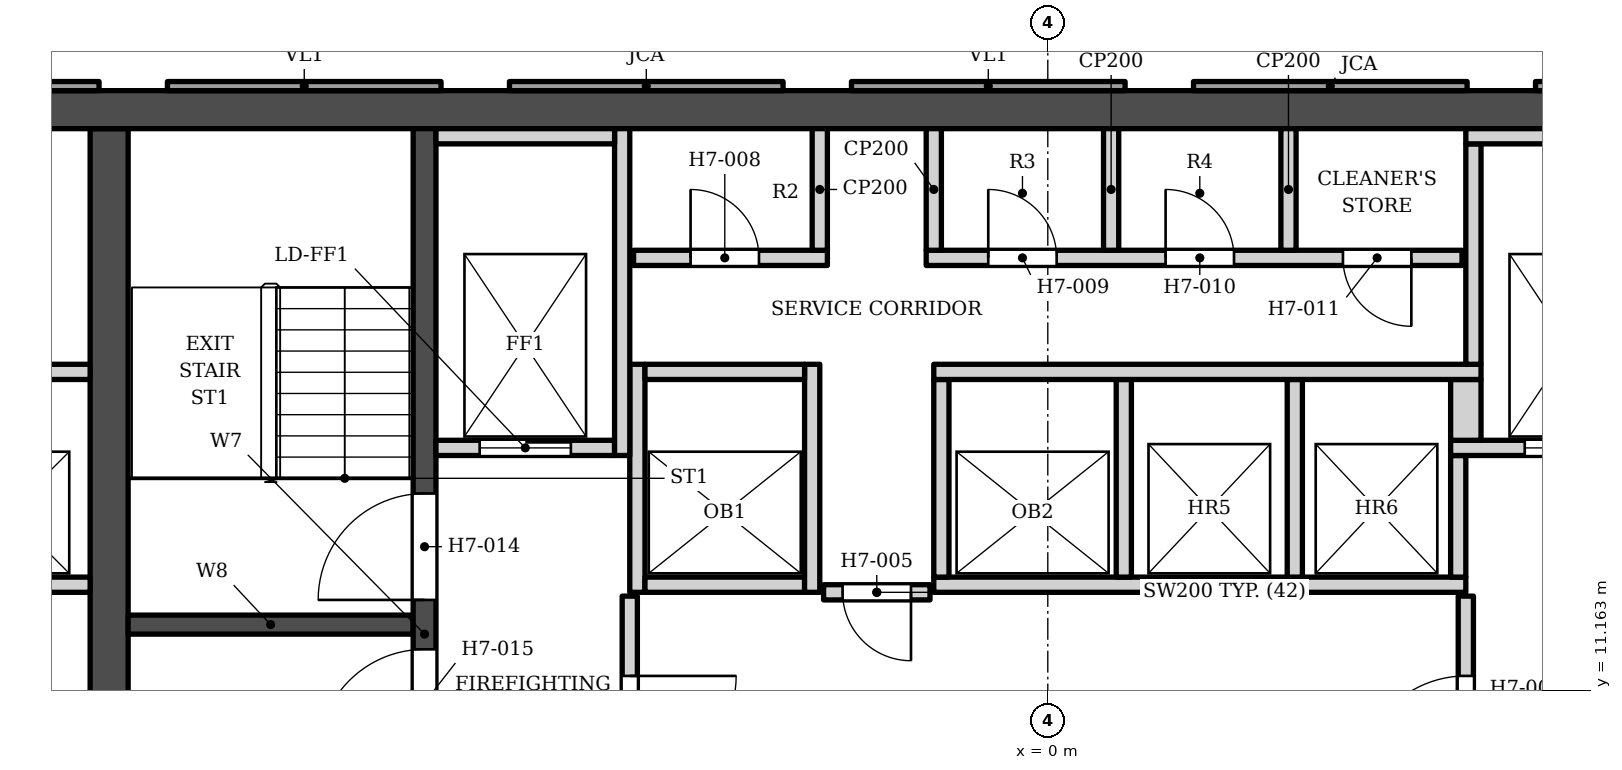
"""IFC4 building model, lengths in metres.
Left out: names, types, materials, properties, quantities, classifications, styles, units other than length and angle.
Written with IfcOpenShell. Run it as: python <this file> out.ifc"""

import sys

from ifc_helpers import new_model, si_unit, direction, frame, frame_2d, origin, place, context, subcontext, project, spatial, polyline, rectangle, outline, extrude, element, fill, save


model = new_model("IFC4")
c1 = context("Model", 3, precision=1e-05, world=origin(), true_north=direction((0.0, 1.0)))
c2 = subcontext(c1, "Body", "Model", "MODEL_VIEW")
j1 = project(units=[si_unit("LENGTHUNIT", "METRE"), si_unit("PLANEANGLEUNIT", "RADIAN")], contexts=[c1])
p1 = place(None, origin())
s1 = spatial("IfcSite", under=j1, at=p1, CompositionType="ELEMENT")
p2 = place(p1, origin())
s2 = spatial("IfcBuilding", under=s1, at=p2, CompositionType="ELEMENT")
p3 = place(p2, frame((0.0, 0.0, 112.2)))
s3 = spatial("IfcBuildingStorey", under=s2, at=p3, CompositionType="ELEMENT", Elevation=112.2)
p4 = place(p3, frame((-16.9, 18.802, 0.0), z_axis=(0.0, 0.0, 1.0), x_axis=(1.0, 0.0, 0.0)))
e1 = element("IfcWall", 1, at=p4, inside=s3, PredefinedType="SHEAR", context=c2, shape_type="SweptSolid", body=[
    extrude(rectangle(XDim=33.8, YDim=0.5, at=frame_2d((16.9, 0.0))), origin(), (0.0, 0.0, 1.0), 3.4),
])
p5 = place(p3, frame((-12.35, 5.253, 0.0), z_axis=(0.0, 0.0, 1.0), x_axis=(0.0, 1.0, 0.0)))
e2 = element("IfcWall", 2, at=p5, inside=s3, PredefinedType="SHEAR", context=c2, shape_type="SweptSolid", body=[
    extrude(rectangle(XDim=13.3, YDim=0.5, at=frame_2d((6.65, 0.0))), origin(), (0.0, 0.0, 1.0), 3.4),
])
p6 = place(p3, frame((-8.2, 5.253, 0.0), z_axis=(0.0, 0.0, 1.0), x_axis=(0.0, 1.0, 0.0)))
e3 = element("IfcWall", 3, at=p6, inside=s3, PredefinedType="SHEAR", context=c2, shape_type="SweptSolid", body=[
    extrude(rectangle(XDim=13.3, YDim=0.3, at=frame_2d((6.65, 0.0))), origin(), (0.0, 0.0, 1.0), 3.4),
])
p7 = place(p6, frame((7.1, 0.0, 0.0)))
e4 = element("IfcOpeningElement", 4, at=p7, cuts=e3, PredefinedType="OPENING", context=c2, shape_type="SweptSolid", body=[
    extrude(rectangle(XDim=1.4, YDim=2.1, at=frame_2d((0.7, 1.05))), frame((0.0, 0.16, 0.0), z_axis=(0.0, -1.0, 0.0), x_axis=(1.0, 0.0, 0.0)), (0.0, 0.0, 1.0), 0.32),
])
p8 = place(p6, frame((5.05, 0.0, 0.0)))
e5 = element("IfcOpeningElement", 5, at=p8, cuts=e3, PredefinedType="OPENING", context=c2, shape_type="SweptSolid", body=[
    extrude(rectangle(XDim=1.4, YDim=2.1, at=frame_2d((0.7, 1.05))), frame((0.0, 0.16, 0.0), z_axis=(0.0, -1.0, 0.0), x_axis=(1.0, 0.0, 0.0)), (0.0, 0.0, 1.0), 0.32),
])
p9 = place(p3, frame((-12.1, 12.028, 0.0), z_axis=(0.0, 0.0, 1.0), x_axis=(1.0, 0.0, 0.0)))
e6 = element("IfcWall", 6, at=p9, inside=s3, PredefinedType="SHEAR", context=c2, shape_type="SweptSolid", body=[
    extrude(rectangle(XDim=3.75, YDim=0.25, at=frame_2d((1.875, 0.0))), origin(), (0.0, 0.0, 1.0), 3.4),
])
p10 = place(p3, origin())
e7 = element("IfcWall", 7, at=p10, inside=s3, PredefinedType="ELEMENTEDWALL", context=c2, shape_type="SweptSolid", body=[
    extrude(outline(polyline([(6.417, 19.173), (6.417, 19.052), (10.017, 19.052), (10.017, 19.173), (6.417, 19.173)])), origin(), (0.0, 0.0, 1.0), 2.65),
])
p11 = place(p3, origin())
e8 = element("IfcWall", 8, at=p11, inside=s3, PredefinedType="SOLIDWALL", context=c2, shape_type="SweptSolid", body=[
    extrude(outline(polyline([(1.917, 19.173), (1.917, 19.052), (5.517, 19.052), (5.517, 19.173), (1.917, 19.173)])), origin(), (0.0, 0.0, 1.0), 2.65),
])
p12 = place(p3, origin())
e9 = element("IfcWall", 9, at=p12, inside=s3, PredefinedType="ELEMENTEDWALL", context=c2, shape_type="SweptSolid", body=[
    extrude(outline(polyline([(-2.583, 19.173), (-2.583, 19.052), (1.017, 19.052), (1.017, 19.173), (-2.583, 19.173)])), origin(), (0.0, 0.0, 1.0), 2.65),
])
p13 = place(p3, origin())
e10 = element("IfcWall", 10, at=p13, inside=s3, PredefinedType="SOLIDWALL", context=c2, shape_type="SweptSolid", body=[
    extrude(outline(polyline([(-7.083, 19.173), (-7.083, 19.052), (-3.483, 19.052), (-3.483, 19.173), (-7.083, 19.173)])), origin(), (0.0, 0.0, 1.0), 2.65),
])
p14 = place(p3, origin())
e11 = element("IfcWall", 11, at=p14, inside=s3, PredefinedType="ELEMENTEDWALL", context=c2, shape_type="SweptSolid", body=[
    extrude(outline(polyline([(-11.583, 19.173), (-11.583, 19.052), (-7.983, 19.052), (-7.983, 19.173), (-11.583, 19.173)])), origin(), (0.0, 0.0, 1.0), 2.65),
])
p15 = place(p3, origin())
e12 = element("IfcWall", 12, at=p15, inside=s3, PredefinedType="SOLIDWALL", context=c2, shape_type="SweptSolid", body=[
    extrude(outline(polyline([(-16.083, 19.173), (-16.083, 19.052), (-12.483, 19.052), (-12.483, 19.173), (-16.083, 19.173)])), origin(), (0.0, 0.0, 1.0), 2.65),
])
p16 = place(p3, frame((-5.5, 9.103, 0.0), z_axis=(0.0, 0.0, 1.0), x_axis=(0.0, 1.0, 0.0)))
e13 = element("IfcWall", 13, at=p16, inside=s3, PredefinedType="SOLIDWALL", context=c2, shape_type="SweptSolid", body=[
    extrude(rectangle(XDim=3.3, YDim=0.2, at=frame_2d((1.65, 0.0))), origin(), (0.0, 0.0, 1.0), 3.23),
])
p17 = place(p16, frame((0.85, 0.0, 0.0)))
e14 = element("IfcOpeningElement", 14, at=p17, cuts=e13, PredefinedType="OPENING", context=c2, shape_type="SweptSolid", body=[
    extrude(rectangle(XDim=1.4, YDim=2.1, at=frame_2d((0.7, 1.05))), frame((0.0, 0.11, 0.0), z_axis=(0.0, -1.0, 0.0), x_axis=(1.0, 0.0, 0.0)), (0.0, 0.0, 1.0), 0.22),
])
p18 = place(p3, frame((5.5, 9.103, 0.0), z_axis=(0.0, 0.0, 1.0), x_axis=(0.0, 1.0, 0.0)))
e15 = element("IfcWall", 15, at=p18, inside=s3, PredefinedType="SOLIDWALL", context=c2, shape_type="SweptSolid", body=[
    extrude(rectangle(XDim=3.3, YDim=0.2, at=frame_2d((1.65, 0.0))), origin(), (0.0, 0.0, 1.0), 3.23),
])
p19 = place(p18, frame((0.85, 0.0, 0.0)))
e16 = element("IfcOpeningElement", 16, at=p19, cuts=e15, PredefinedType="OPENING", context=c2, shape_type="SweptSolid", body=[
    extrude(rectangle(XDim=1.4, YDim=2.1, at=frame_2d((0.7, 1.05))), frame((0.0, 0.11, 0.0), z_axis=(0.0, -1.0, 0.0), x_axis=(1.0, 0.0, 0.0)), (0.0, 0.0, 1.0), 0.22),
])
p20 = place(p3, frame((-2.95, 12.453, 0.0), z_axis=(0.0, 0.0, 1.0), x_axis=(1.0, 0.0, 0.0)))
e17 = element("IfcWall", 17, at=p20, inside=s3, PredefinedType="SOLIDWALL", context=c2, shape_type="SweptSolid", body=[
    extrude(rectangle(XDim=1.4, YDim=0.2, at=frame_2d((0.7, 0.0))), origin(), (0.0, 0.0, 1.0), 3.23),
])
p21 = place(p20, frame((0.25, 0.0, 0.0)))
e18 = element("IfcOpeningElement", 18, at=p21, cuts=e17, PredefinedType="OPENING", context=c2, shape_type="SweptSolid", body=[
    extrude(rectangle(XDim=0.9, YDim=2.1, at=frame_2d((0.45, 1.05))), frame((0.0, 0.11, 0.0), z_axis=(0.0, -1.0, 0.0), x_axis=(1.0, 0.0, 0.0)), (0.0, 0.0, 1.0), 0.22),
])
p22 = place(p3, frame((-16.9, 12.552, 0.0), z_axis=(0.0, 0.0, 1.0), x_axis=(1.0, 0.0, 0.0)))
e19 = element("IfcWall", 19, at=p22, inside=s3, PredefinedType="SOLIDWALL", context=c2, shape_type="SweptSolid", body=[
    extrude(rectangle(XDim=4.3, YDim=0.2, at=frame_2d((2.15, 0.0))), origin(), (0.0, 0.0, 1.0), 3.23),
])
p23 = place(p22, frame((2.675, 0.0, 0.0)))
e20 = element("IfcOpeningElement", 20, at=p23, cuts=e19, PredefinedType="OPENING", context=c2, shape_type="SweptSolid", body=[
    extrude(rectangle(XDim=1.1, YDim=2.1, at=frame_2d((0.55, 1.05))), frame((0.0, 0.11, 0.0), z_axis=(0.0, -1.0, 0.0), x_axis=(1.0, 0.0, 0.0)), (0.0, 0.0, 1.0), 0.22),
])
p24 = place(p22, frame((0.425, 0.0, 0.0)))
e21 = element("IfcOpeningElement", 21, at=p24, cuts=e19, PredefinedType="OPENING", context=c2, shape_type="SweptSolid", body=[
    extrude(rectangle(XDim=1.1, YDim=2.1, at=frame_2d((0.55, 1.05))), frame((0.0, 0.11, 0.0), z_axis=(0.0, -1.0, 0.0), x_axis=(1.0, 0.0, 0.0)), (0.0, 0.0, 1.0), 0.22),
])
p25 = place(p3, frame((-5.4, 12.453, 0.0), z_axis=(0.0, 0.0, 1.0), x_axis=(0.0, 1.0, 0.0)))
e22 = element("IfcWall", 22, at=p25, inside=s3, PredefinedType="SOLIDWALL", context=c2, shape_type="SweptSolid", body=[
    extrude(rectangle(XDim=3.0, YDim=0.2, at=frame_2d((1.5, 0.0))), origin(), (0.0, 0.0, 1.0), 3.23),
])
p26 = place(p3, frame((-5.3, 12.552, 0.0), z_axis=(0.0, 0.0, 1.0), x_axis=(1.0, 0.0, 0.0)))
e23 = element("IfcWall", 23, at=p26, inside=s3, PredefinedType="SOLIDWALL", context=c2, shape_type="SweptSolid", body=[
    extrude(rectangle(XDim=2.1, YDim=0.2, at=frame_2d((1.05, 0.0))), origin(), (0.0, 0.0, 1.0), 3.23),
])
p27 = place(p3, frame((-3.1, 12.453, 0.0), z_axis=(0.0, 0.0, 1.0), x_axis=(0.0, 1.0, 0.0)))
e24 = element("IfcWall", 24, at=p27, inside=s3, PredefinedType="SOLIDWALL", context=c2, shape_type="SweptSolid", body=[
    extrude(rectangle(XDim=3.0, YDim=0.2, at=frame_2d((1.5, 0.0))), origin(), (0.0, 0.0, 1.0), 3.23),
])
p28 = place(p3, frame((-1.5, 12.552, 0.0), z_axis=(0.0, 0.0, 1.0), x_axis=(1.0, 0.0, 0.0)))
e25 = element("IfcWall", 25, at=p28, inside=s3, PredefinedType="SOLIDWALL", context=c2, shape_type="SweptSolid", body=[
    extrude(rectangle(XDim=7.0, YDim=0.2, at=frame_2d((3.5, 0.0))), origin(), (0.0, 0.0, 1.0), 3.23),
])
for number, where, z_axis, x_axis in (
    (26, (-1.4, 12.653, 0.0), (0.0, 0.0, 1.0), (0.0, 1.0, 0.0)),
    (27, (1.0, 12.653, 0.0), (0.0, 0.0, 1.0), (0.0, 1.0, 0.0)),
    (28, (3.25, 12.653, 0.0), (0.0, 0.0, 1.0), (0.0, 1.0, 0.0)),
):
    element("IfcWall", number, at=place(p3, frame(where, z_axis=z_axis, x_axis=x_axis)), inside=s3, PredefinedType="SOLIDWALL", context=c2, shape_type="SweptSolid", body=[
        extrude(rectangle(XDim=2.6, YDim=0.2, at=frame_2d((1.3, 0.0))), origin(), (0.0, 0.0, 1.0), 3.23),
    ])
p29 = place(p3, frame((5.4, 12.653, 0.0), z_axis=(0.0, 0.0, 1.0), x_axis=(0.0, 1.0, 0.0)))
e29 = element("IfcWall", 29, at=p29, inside=s3, PredefinedType="SOLIDWALL", context=c2, shape_type="SweptSolid", body=[
    extrude(rectangle(XDim=1.6, YDim=0.2, at=frame_2d((0.8, 0.0))), origin(), (0.0, 0.0, 1.0), 3.23),
])
p30 = place(p3, frame((-8.05, 14.353, 0.0), z_axis=(0.0, 0.0, 1.0), x_axis=(1.0, 0.0, 0.0)))
e30 = element("IfcWall", 30, at=p30, inside=s3, PredefinedType="SOLIDWALL", context=c2, shape_type="SweptSolid", body=[
    extrude(rectangle(XDim=2.35, YDim=0.2, at=frame_2d((1.175, 0.0))), origin(), (0.0, 0.0, 1.0), 3.23),
])
p31 = place(p30, frame((0.575, 0.0, 0.0)))
e31 = element("IfcOpeningElement", 31, at=p31, cuts=e30, PredefinedType="OPENING", context=c2, shape_type="SweptSolid", body=[
    extrude(rectangle(XDim=1.2, YDim=2.1, at=frame_2d((0.6, 1.05))), frame((0.0, 0.11, 0.0), z_axis=(0.0, -1.0, 0.0), x_axis=(1.0, 0.0, 0.0)), (0.0, 0.0, 1.0), 0.22),
])
p32 = place(p3, frame((-5.6, 14.253, 0.0), z_axis=(0.0, 0.0, 1.0), x_axis=(0.0, 1.0, 0.0)))
e32 = element("IfcWall", 32, at=p32, inside=s3, PredefinedType="SOLIDWALL", context=c2, shape_type="SweptSolid", body=[
    extrude(rectangle(XDim=4.3, YDim=0.2, at=frame_2d((2.15, 0.0))), origin(), (0.0, 0.0, 1.0), 3.23),
])
p33 = place(p3, frame((5.3, 14.353, 0.0), z_axis=(0.0, 0.0, 1.0), x_axis=(1.0, 0.0, 0.0)))
e33 = element("IfcWall", 33, at=p33, inside=s3, PredefinedType="SOLIDWALL", context=c2, shape_type="SweptSolid", body=[
    extrude(rectangle(XDim=2.75, YDim=0.2, at=frame_2d((1.375, 0.0))), origin(), (0.0, 0.0, 1.0), 3.23),
])
p34 = place(p33, frame((0.975, 0.0, 0.0)))
e34 = element("IfcOpeningElement", 34, at=p34, cuts=e33, PredefinedType="OPENING", context=c2, shape_type="SweptSolid", body=[
    extrude(rectangle(XDim=1.2, YDim=2.1, at=frame_2d((0.6, 1.05))), frame((0.0, 0.11, 0.0), z_axis=(0.0, -1.0, 0.0), x_axis=(1.0, 0.0, 0.0)), (0.0, 0.0, 1.0), 0.22),
])
p35 = place(p3, frame((5.5, 14.453, 0.0), z_axis=(0.0, 0.0, 1.0), x_axis=(0.0, 1.0, 0.0)))
e35 = element("IfcWall", 35, at=p35, inside=s3, PredefinedType="SOLIDWALL", context=c2, shape_type="SweptSolid", body=[
    extrude(rectangle(XDim=0.8, YDim=0.4, at=frame_2d((0.4, 0.0))), origin(), (0.0, 0.0, 1.0), 3.23),
])
p36 = place(p3, frame((-16.9, 15.353, 0.0), z_axis=(0.0, 0.0, 1.0), x_axis=(1.0, 0.0, 0.0)))
e36 = element("IfcWall", 36, at=p36, inside=s3, PredefinedType="SOLIDWALL", context=c2, shape_type="SweptSolid", body=[
    extrude(rectangle(XDim=4.3, YDim=0.2, at=frame_2d((2.15, 0.0))), origin(), (0.0, 0.0, 1.0), 3.23),
])
p37 = place(p3, frame((-5.3, 15.353, 0.0), z_axis=(0.0, 0.0, 1.0), x_axis=(1.0, 0.0, 0.0)))
e37 = element("IfcWall", 37, at=p37, inside=s3, PredefinedType="SOLIDWALL", context=c2, shape_type="SweptSolid", body=[
    extrude(rectangle(XDim=2.1, YDim=0.2, at=frame_2d((1.05, 0.0))), origin(), (0.0, 0.0, 1.0), 3.23),
])
p38 = place(p3, frame((-1.5, 15.353, 0.0), z_axis=(0.0, 0.0, 1.0), x_axis=(1.0, 0.0, 0.0)))
e38 = element("IfcWall", 38, at=p38, inside=s3, PredefinedType="SOLIDWALL", context=c2, shape_type="SweptSolid", body=[
    extrude(rectangle(XDim=7.2, YDim=0.2, at=frame_2d((3.6, 0.0))), origin(), (0.0, 0.0, 1.0), 3.23),
])
p39 = place(p3, frame((5.6, 15.453, 0.0), z_axis=(0.0, 0.0, 1.0), x_axis=(0.0, 1.0, 0.0)))
e39 = element("IfcWall", 39, at=p39, inside=s3, PredefinedType="SOLIDWALL", context=c2, shape_type="SweptSolid", body=[
    extrude(rectangle(XDim=2.9, YDim=0.2, at=frame_2d((1.45, 0.0))), origin(), (0.0, 0.0, 1.0), 3.23),
])
p40 = place(p3, frame((-5.45, 16.853, 0.0), z_axis=(0.0, 0.0, 1.0), x_axis=(1.0, 0.0, 0.0)))
e40 = element("IfcWall", 40, at=p40, inside=s3, PredefinedType="SOLIDWALL", context=c2, shape_type="SweptSolid", body=[
    extrude(rectangle(XDim=2.55, YDim=0.2, at=frame_2d((1.275, 0.0))), origin(), (0.0, 0.0, 1.0), 3.23),
])
p41 = place(p40, frame((0.75, 0.0, 0.0)))
e41 = element("IfcOpeningElement", 41, at=p41, cuts=e40, PredefinedType="OPENING", context=c2, shape_type="SweptSolid", body=[
    extrude(rectangle(XDim=0.9, YDim=2.1, at=frame_2d((0.45, 1.05))), frame((0.0, 0.11, 0.0), z_axis=(0.0, -1.0, 0.0), x_axis=(1.0, 0.0, 0.0)), (0.0, 0.0, 1.0), 0.22),
])
p42 = place(p3, frame((-1.6, 16.853, 0.0), z_axis=(0.0, 0.0, 1.0), x_axis=(1.0, 0.0, 0.0)))
e42 = element("IfcWall", 42, at=p42, inside=s3, PredefinedType="SOLIDWALL", context=c2, shape_type="SweptSolid", body=[
    extrude(rectangle(XDim=7.05, YDim=0.2, at=frame_2d((3.525, 0.0))), origin(), (0.0, 0.0, 1.0), 3.23),
])
p43 = place(p42, frame((0.817, 0.0, 0.0)))
e43 = element("IfcOpeningElement", 43, at=p43, cuts=e42, PredefinedType="OPENING", context=c2, shape_type="SweptSolid", body=[
    extrude(rectangle(XDim=0.9, YDim=2.1, at=frame_2d((0.45, 1.05))), frame((0.0, 0.11, 0.0), z_axis=(0.0, -1.0, 0.0), x_axis=(1.0, 0.0, 0.0)), (0.0, 0.0, 1.0), 0.22),
])
p44 = place(p42, frame((3.15, 0.0, 0.0)))
e44 = element("IfcOpeningElement", 44, at=p44, cuts=e42, PredefinedType="OPENING", context=c2, shape_type="SweptSolid", body=[
    extrude(rectangle(XDim=0.9, YDim=2.1, at=frame_2d((0.45, 1.05))), frame((0.0, 0.11, 0.0), z_axis=(0.0, -1.0, 0.0), x_axis=(1.0, 0.0, 0.0)), (0.0, 0.0, 1.0), 0.22),
])
p45 = place(p42, frame((5.483, 0.0, 0.0)))
e45 = element("IfcOpeningElement", 45, at=p45, cuts=e42, PredefinedType="OPENING", context=c2, shape_type="SweptSolid", body=[
    extrude(rectangle(XDim=0.9, YDim=2.1, at=frame_2d((0.45, 1.05))), frame((0.0, 0.11, 0.0), z_axis=(0.0, -1.0, 0.0), x_axis=(1.0, 0.0, 0.0)), (0.0, 0.0, 1.0), 0.22),
])
for number, where, z_axis, x_axis in (
    (46, (-3.0, 16.953, 0.0), (0.0, 0.0, 1.0), (0.0, 1.0, 0.0)),
    (47, (-1.5, 16.953, 0.0), (0.0, 0.0, 1.0), (0.0, 1.0, 0.0)),
    (48, (0.833, 16.953, 0.0), (0.0, 0.0, 1.0), (0.0, 1.0, 0.0)),
    (49, (3.167, 16.953, 0.0), (0.0, 0.0, 1.0), (0.0, 1.0, 0.0)),
):
    element("IfcWall", number, at=place(p3, frame(where, z_axis=z_axis, x_axis=x_axis)), inside=s3, PredefinedType="PARTITIONING", context=c2, shape_type="SweptSolid", body=[
        extrude(rectangle(XDim=1.6, YDim=0.2, at=frame_2d((0.8, 0.0))), origin(), (0.0, 0.0, 1.0), 3.23),
    ])
p46 = place(p3, frame((-8.05, 18.453, 0.0), z_axis=(0.0, 0.0, 1.0), x_axis=(1.0, 0.0, 0.0)))
e50 = element("IfcWall", 50, at=p46, inside=s3, PredefinedType="SOLIDWALL", context=c2, shape_type="SweptSolid", body=[
    extrude(rectangle(XDim=2.35, YDim=0.2, at=frame_2d((1.175, 0.0))), origin(), (0.0, 0.0, 1.0), 3.23),
])
p47 = place(p3, frame((5.5, 18.453, 0.0), z_axis=(0.0, 0.0, 1.0), x_axis=(1.0, 0.0, 0.0)))
e51 = element("IfcWall", 51, at=p47, inside=s3, PredefinedType="SOLIDWALL", context=c2, shape_type="SweptSolid", body=[
    extrude(rectangle(XDim=2.55, YDim=0.2, at=frame_2d((1.275, 0.0))), origin(), (0.0, 0.0, 1.0), 3.23),
])
p48 = place(p31, origin())
e52 = element("IfcDoor", 52, at=p48, inside=s3, OperationType="DOUBLE_DOOR_SLIDING", PredefinedType="DOOR", context=c2, shape_type="SweptSolid", body=[
    extrude(rectangle(XDim=1.2, YDim=2.1, at=frame_2d((0.6, 1.05))), frame((0.0, 0.025, 0.0), z_axis=(0.0, -1.0, 0.0), x_axis=(1.0, 0.0, 0.0)), (0.0, 0.0, 1.0), 0.05),
])
fill(e31, e52)
p49 = place(p34, origin())
e53 = element("IfcDoor", 53, at=p49, inside=s3, OperationType="DOUBLE_DOOR_SLIDING", PredefinedType="DOOR", context=c2, shape_type="SweptSolid", body=[
    extrude(rectangle(XDim=1.2, YDim=2.1, at=frame_2d((0.6, 1.05))), frame((0.0, 0.025, 0.0), z_axis=(0.0, -1.0, 0.0), x_axis=(1.0, 0.0, 0.0)), (0.0, 0.0, 1.0), 0.05),
])
fill(e34, e53)
p50 = place(p7, origin())
e54 = element("IfcDoor", 54, at=p50, inside=s3, OperationType="SINGLE_SWING_LEFT", PredefinedType="DOOR", context=c2, shape_type="SweptSolid", body=[
    extrude(rectangle(XDim=1.4, YDim=2.1, at=frame_2d((0.7, 1.05))), frame((0.0, 0.025, 0.0), z_axis=(0.0, -1.0, 0.0), x_axis=(1.0, 0.0, 0.0)), (0.0, 0.0, 1.0), 0.05),
])
fill(e4, e54)
p51 = place(p8, origin())
e55 = element("IfcDoor", 55, at=p51, inside=s3, OperationType="SINGLE_SWING_LEFT", PredefinedType="DOOR", context=c2, shape_type="SweptSolid", body=[
    extrude(rectangle(XDim=1.4, YDim=2.1, at=frame_2d((0.7, 1.05))), frame((0.0, 0.025, 0.0), z_axis=(0.0, -1.0, 0.0), x_axis=(1.0, 0.0, 0.0)), (0.0, 0.0, 1.0), 0.05),
])
fill(e5, e55)
p52 = place(p21, origin())
e56 = element("IfcDoor", 56, at=p52, inside=s3, OperationType="SINGLE_SWING_RIGHT", PredefinedType="DOOR", context=c2, shape_type="SweptSolid", body=[
    extrude(rectangle(XDim=0.9, YDim=2.1, at=frame_2d((0.45, 1.05))), frame((0.0, 0.025, 0.0), z_axis=(0.0, -1.0, 0.0), x_axis=(1.0, 0.0, 0.0)), (0.0, 0.0, 1.0), 0.05),
])
fill(e18, e56)
p53 = place(p17, origin())
e57 = element("IfcDoor", 57, at=p53, inside=s3, OperationType="SINGLE_SWING_RIGHT", PredefinedType="DOOR", context=c2, shape_type="SweptSolid", body=[
    extrude(rectangle(XDim=1.4, YDim=2.1, at=frame_2d((0.7, 1.05))), frame((0.0, 0.025, 0.0), z_axis=(0.0, -1.0, 0.0), x_axis=(1.0, 0.0, 0.0)), (0.0, 0.0, 1.0), 0.05),
])
fill(e14, e57)
p54 = place(p19, origin())
e58 = element("IfcDoor", 58, at=p54, inside=s3, OperationType="SINGLE_SWING_LEFT", PredefinedType="DOOR", context=c2, shape_type="SweptSolid", body=[
    extrude(rectangle(XDim=1.4, YDim=2.1, at=frame_2d((0.7, 1.05))), frame((0.0, 0.025, 0.0), z_axis=(0.0, -1.0, 0.0), x_axis=(1.0, 0.0, 0.0)), (0.0, 0.0, 1.0), 0.05),
])
fill(e16, e58)
p55 = place(p41, origin())
e59 = element("IfcDoor", 59, at=p55, inside=s3, OperationType="SINGLE_SWING_LEFT", PredefinedType="DOOR", context=c2, shape_type="SweptSolid", body=[
    extrude(rectangle(XDim=0.9, YDim=2.1, at=frame_2d((0.45, 1.05))), frame((0.0, 0.025, 0.0), z_axis=(0.0, -1.0, 0.0), x_axis=(1.0, 0.0, 0.0)), (0.0, 0.0, 1.0), 0.05),
])
fill(e41, e59)
p56 = place(p43, origin())
e60 = element("IfcDoor", 60, at=p56, inside=s3, OperationType="SINGLE_SWING_LEFT", PredefinedType="DOOR", context=c2, shape_type="SweptSolid", body=[
    extrude(rectangle(XDim=0.9, YDim=2.1, at=frame_2d((0.45, 1.05))), frame((0.0, 0.025, 0.0), z_axis=(0.0, -1.0, 0.0), x_axis=(1.0, 0.0, 0.0)), (0.0, 0.0, 1.0), 0.05),
])
fill(e43, e60)
p57 = place(p44, origin())
e61 = element("IfcDoor", 61, at=p57, inside=s3, OperationType="SINGLE_SWING_LEFT", PredefinedType="DOOR", context=c2, shape_type="SweptSolid", body=[
    extrude(rectangle(XDim=0.9, YDim=2.1, at=frame_2d((0.45, 1.05))), frame((0.0, 0.025, 0.0), z_axis=(0.0, -1.0, 0.0), x_axis=(1.0, 0.0, 0.0)), (0.0, 0.0, 1.0), 0.05),
])
fill(e44, e61)
p58 = place(p45, origin())
e62 = element("IfcDoor", 62, at=p58, inside=s3, OperationType="SINGLE_SWING_RIGHT", PredefinedType="DOOR", context=c2, shape_type="SweptSolid", body=[
    extrude(rectangle(XDim=0.9, YDim=2.1, at=frame_2d((0.45, 1.05))), frame((0.0, 0.025, 0.0), z_axis=(0.0, -1.0, 0.0), x_axis=(1.0, 0.0, 0.0)), (0.0, 0.0, 1.0), 0.05),
])
fill(e45, e62)
save(model, sys.argv[1])
